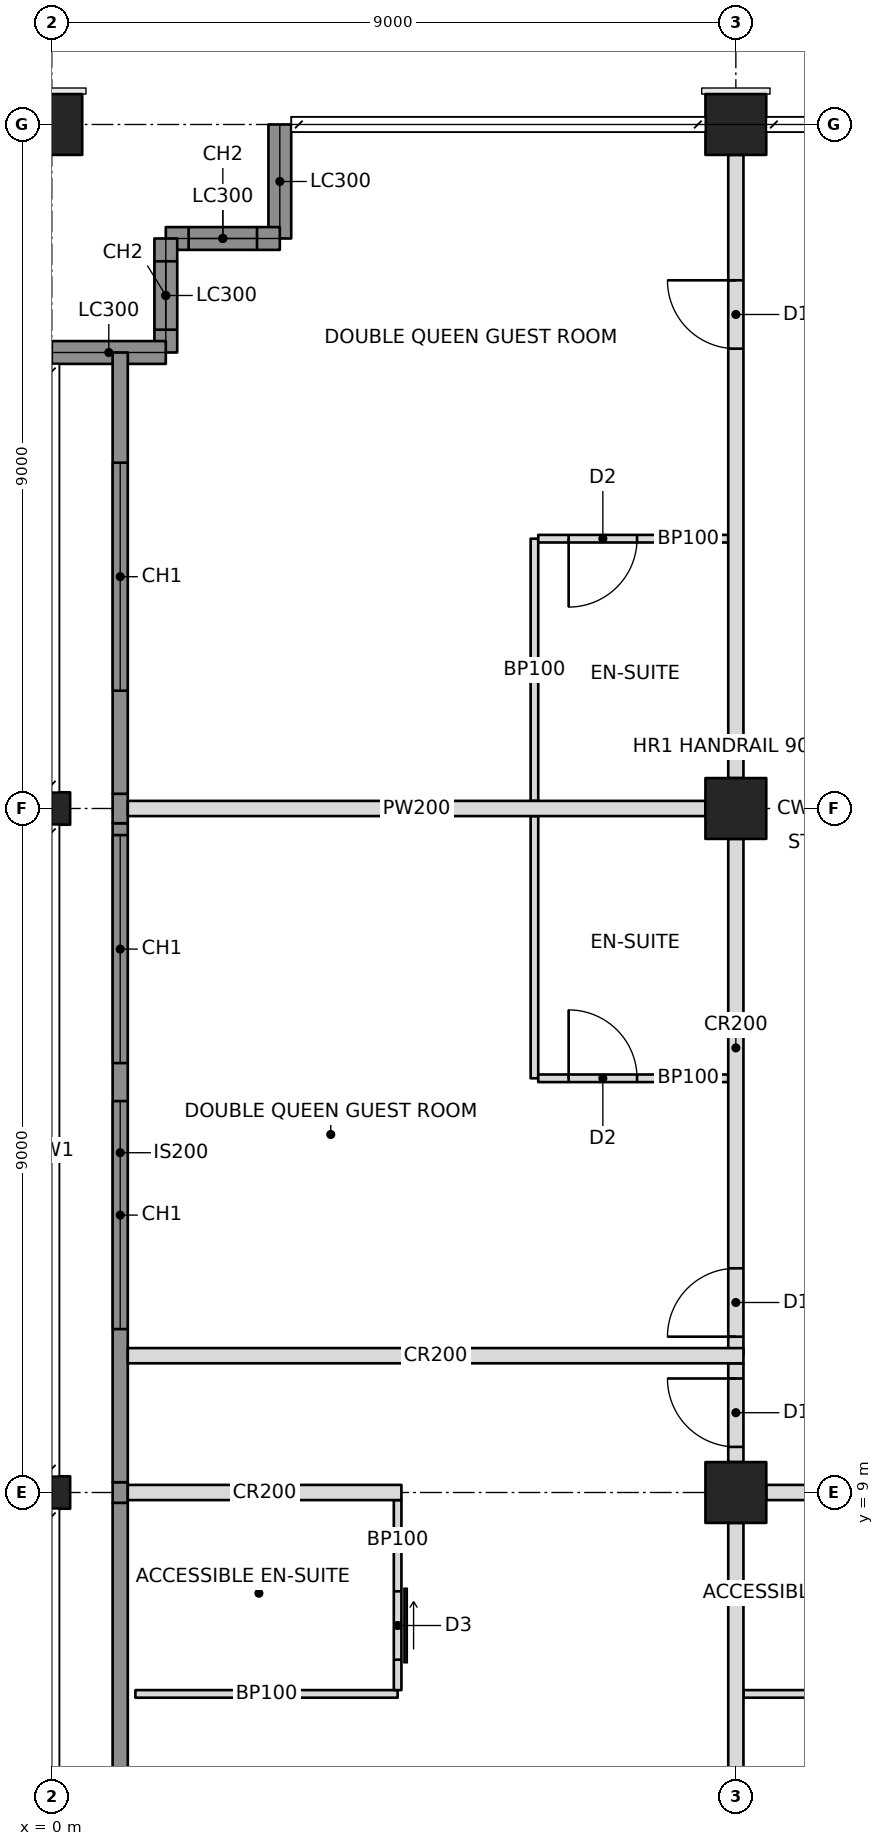
"""IFC4 building model, lengths in metres.
Left out: names, types, materials, properties, quantities, classifications, styles, units other than length and angle.
Written with IfcOpenShell. Run it as: python <this file> out.ifc"""

import sys

from ifc_helpers import new_model, si_unit, direction, frame, frame_2d, origin, origin_2d, place, context, subcontext, project, spatial, rectangle, hollow_rectangle, i_section, extrude, element, fill, save


model = new_model("IFC4")
c1 = context("Model", 3, precision=1e-05, world=origin(), true_north=direction((0.0, 1.0)))
c2 = subcontext(c1, "Body", "Model", "MODEL_VIEW")
j1 = project(units=[si_unit("LENGTHUNIT", "METRE"), si_unit("PLANEANGLEUNIT", "RADIAN")], contexts=[c1])
p1 = place(None, origin())
s1 = spatial("IfcSite", under=j1, at=p1, CompositionType="ELEMENT")
p2 = place(p1, origin())
s2 = spatial("IfcBuilding", under=s1, at=p2, CompositionType="ELEMENT")
p3 = place(p2, frame((0.0, 0.0, 194.4)))
s3 = spatial("IfcBuildingStorey", under=s2, at=p3, CompositionType="ELEMENT", Elevation=194.4)
for number, where, z_axis, x_axis in (
    (1, (0.0, 9.0, 0.0), (0.0, 0.0, 1.0), (0.0, 1.0, 0.0)),
    (2, (0.0, 18.0, 0.0), (0.0, 0.0, 1.0), (0.0, 1.0, 0.0)),
):
    element("IfcColumn", number, at=place(p3, frame(where, z_axis=z_axis, x_axis=x_axis)), inside=s3, PredefinedType="COLUMN", context=c2, shape_type="SweptSolid", body=[
        extrude(i_section(OverallWidth=0.427, OverallDepth=0.483, WebThickness=0.051, FlangeThickness=0.082, at=origin_2d()), origin(), (0.0, 0.0, 1.0), 3.4),
    ])
p4 = place(p3, frame((0.0, 27.0, 0.0), z_axis=(0.0, 0.0, 1.0), x_axis=(0.0, 1.0, 0.0)))
e3 = element("IfcColumn", 3, at=p4, inside=s3, PredefinedType="COLUMN", context=c2, shape_type="SweptSolid", body=[
    extrude(hollow_rectangle(XDim=0.8, YDim=0.8, WallThickness=0.06, at=origin_2d()), origin(), (0.0, 0.0, 1.0), 3.4),
])
for number, where, z_axis, x_axis in (
    (4, (9.0, 9.0, 0.0), (0.0, 0.0, 1.0), (1.0, 0.0, 0.0)),
    (5, (9.0, 18.0, 0.0), (0.0, 0.0, 1.0), (1.0, 0.0, 0.0)),
):
    element("IfcColumn", number, at=place(p3, frame(where, z_axis=z_axis, x_axis=x_axis)), inside=s3, PredefinedType="COLUMN", context=c2, shape_type="SweptSolid", body=[
        extrude(hollow_rectangle(XDim=0.8, YDim=0.8, WallThickness=0.05, at=origin_2d()), origin(), (0.0, 0.0, 1.0), 3.4),
    ])
p5 = place(p3, frame((9.0, 27.0, 0.0), z_axis=(0.0, 0.0, 1.0), x_axis=(1.0, 0.0, 0.0)))
e6 = element("IfcColumn", 6, at=p5, inside=s3, PredefinedType="COLUMN", context=c2, shape_type="SweptSolid", body=[
    extrude(hollow_rectangle(XDim=0.8, YDim=0.8, WallThickness=0.06, at=origin_2d()), origin(), (0.0, 0.0, 1.0), 3.4),
])
p6 = place(p3, frame((3.0, 27.0, 0.0), z_axis=(0.0, 0.0, 1.0), x_axis=(0.0, -1.0, 0.0)))
e7 = element("IfcWall", 7, at=p6, inside=s3, PredefinedType="SOLIDWALL", context=c2, shape_type="SweptSolid", body=[
    extrude(rectangle(XDim=1.5, YDim=0.3, at=frame_2d((0.75, 0.0))), origin(), (0.0, 0.0, 1.0), 2.42),
])
p7 = place(p3, frame((3.0, 25.5, 0.0), z_axis=(0.0, 0.0, 1.0), x_axis=(-1.0, 0.0, 0.0)))
e8 = element("IfcWall", 8, at=p7, inside=s3, PredefinedType="SOLIDWALL", context=c2, shape_type="SweptSolid", body=[
    extrude(rectangle(XDim=1.5, YDim=0.3, at=frame_2d((0.75, 0.0))), origin(), (0.0, 0.0, 1.0), 3.2),
])
p8 = place(p7, frame((0.3, 0.0, 0.6)))
e9 = element("IfcOpeningElement", 9, at=p8, cuts=e8, PredefinedType="OPENING", context=c2, shape_type="SweptSolid", body=[
    extrude(rectangle(XDim=0.9, YDim=2.2, at=frame_2d((0.45, 1.1))), frame((0.0, 0.16, 0.0), z_axis=(0.0, -1.0, 0.0), x_axis=(1.0, 0.0, 0.0)), (0.0, 0.0, 1.0), 0.32),
])
p9 = place(p3, frame((1.5, 25.5, 0.0), z_axis=(0.0, 0.0, 1.0), x_axis=(0.0, -1.0, 0.0)))
e10 = element("IfcWall", 10, at=p9, inside=s3, PredefinedType="SOLIDWALL", context=c2, shape_type="SweptSolid", body=[
    extrude(rectangle(XDim=1.5, YDim=0.3, at=frame_2d((0.75, 0.0))), origin(), (0.0, 0.0, 1.0), 3.2),
])
p10 = place(p9, frame((0.3, 0.0, 0.6)))
e11 = element("IfcOpeningElement", 11, at=p10, cuts=e10, PredefinedType="OPENING", context=c2, shape_type="SweptSolid", body=[
    extrude(rectangle(XDim=0.9, YDim=2.2, at=frame_2d((0.45, 1.1))), frame((0.0, 0.16, 0.0), z_axis=(0.0, -1.0, 0.0), x_axis=(1.0, 0.0, 0.0)), (0.0, 0.0, 1.0), 0.32),
])
p11 = place(p3, frame((1.5, 24.0, 0.0), z_axis=(0.0, 0.0, 1.0), x_axis=(-1.0, 0.0, 0.0)))
e12 = element("IfcWall", 12, at=p11, inside=s3, PredefinedType="SOLIDWALL", context=c2, shape_type="SweptSolid", body=[
    extrude(rectangle(XDim=1.5, YDim=0.3, at=frame_2d((0.75, 0.0))), origin(), (0.0, 0.0, 1.0), 2.42),
])
p12 = place(p3, frame((1.0, 9.0, 0.0), z_axis=(0.0, 0.0, 1.0), x_axis=(1.0, 0.0, 0.0)))
e13 = element("IfcWall", 13, at=p12, inside=s3, PredefinedType="PARTITIONING", context=c2, shape_type="SweptSolid", body=[
    extrude(rectangle(XDim=3.6, YDim=0.2, at=frame_2d((1.8, 0.0))), origin(), (0.0, 0.0, 1.0), 2.438),
])
p13 = place(p3, frame((9.4, 9.0, 0.0), z_axis=(0.0, 0.0, 1.0), x_axis=(1.0, 0.0, 0.0)))
e14 = element("IfcWall", 14, at=p13, inside=s3, PredefinedType="PARTITIONING", context=c2, shape_type="SweptSolid", body=[
    extrude(rectangle(XDim=8.2, YDim=0.2, at=frame_2d((4.1, 0.0))), origin(), (0.0, 0.0, 1.0), 2.405),
])
p14 = place(p13, frame((2.95, 0.0, 0.0)))
e15 = element("IfcOpeningElement", 15, at=p14, cuts=e14, PredefinedType="OPENING", context=c2, shape_type="SweptSolid", body=[
    extrude(rectangle(XDim=0.9, YDim=2.1, at=frame_2d((0.45, 1.05))), frame((0.0, 0.11, 0.0), z_axis=(0.0, -1.0, 0.0), x_axis=(1.0, 0.0, 0.0)), (0.0, 0.0, 1.0), 0.22),
])
p15 = place(p13, frame((4.35, 0.0, 0.0)))
e16 = element("IfcOpeningElement", 16, at=p15, cuts=e14, PredefinedType="OPENING", context=c2, shape_type="SweptSolid", body=[
    extrude(rectangle(XDim=0.9, YDim=2.1, at=frame_2d((0.45, 1.05))), frame((0.0, 0.11, 0.0), z_axis=(0.0, -1.0, 0.0), x_axis=(1.0, 0.0, 0.0)), (0.0, 0.0, 1.0), 0.22),
])
p16 = place(p3, frame((9.0, 10.8, 0.0), z_axis=(0.0, 0.0, 1.0), x_axis=(0.0, 1.0, 0.0)))
e17 = element("IfcWall", 17, at=p16, inside=s3, PredefinedType="PARTITIONING", context=c2, shape_type="SweptSolid", body=[
    extrude(rectangle(XDim=6.8, YDim=0.2, at=frame_2d((3.4, 0.0))), origin(), (0.0, 0.0, 1.0), 2.405),
])
p17 = place(p16, frame((0.25, 0.0, 0.0)))
e18 = element("IfcOpeningElement", 18, at=p17, cuts=e17, PredefinedType="OPENING", context=c2, shape_type="SweptSolid", body=[
    extrude(rectangle(XDim=0.9, YDim=2.1, at=frame_2d((0.45, 1.05))), frame((0.0, 0.11, 0.0), z_axis=(0.0, -1.0, 0.0), x_axis=(1.0, 0.0, 0.0)), (0.0, 0.0, 1.0), 0.22),
])
p18 = place(p3, frame((9.0, 18.4, 0.0), z_axis=(0.0, 0.0, 1.0), x_axis=(0.0, 1.0, 0.0)))
e19 = element("IfcWall", 19, at=p18, inside=s3, PredefinedType="PARTITIONING", context=c2, shape_type="SweptSolid", body=[
    extrude(rectangle(XDim=8.2, YDim=0.2, at=frame_2d((4.1, 0.0))), origin(), (0.0, 0.0, 1.0), 2.405),
])
p19 = place(p18, frame((5.65, 0.0, 0.0)))
e20 = element("IfcOpeningElement", 20, at=p19, cuts=e19, PredefinedType="OPENING", context=c2, shape_type="SweptSolid", body=[
    extrude(rectangle(XDim=0.9, YDim=2.1, at=frame_2d((0.45, 1.05))), frame((0.0, 0.11, 0.0), z_axis=(0.0, -1.0, 0.0), x_axis=(1.0, 0.0, 0.0)), (0.0, 0.0, 1.0), 0.22),
])
p20 = place(p3, frame((1.0, 10.8, 0.0), z_axis=(0.0, 0.0, 1.0), x_axis=(1.0, 0.0, 0.0)))
e21 = element("IfcWall", 21, at=p20, inside=s3, PredefinedType="PARTITIONING", context=c2, shape_type="SweptSolid", body=[
    extrude(rectangle(XDim=8.1, YDim=0.2, at=frame_2d((4.05, 0.0))), origin(), (0.0, 0.0, 1.0), 2.404),
])
p21 = place(p3, frame((9.0, 8.6, 0.0), z_axis=(0.0, 0.0, 1.0), x_axis=(0.0, -1.0, 0.0)))
e22 = element("IfcWall", 22, at=p21, inside=s3, PredefinedType="PARTITIONING", context=c2, shape_type="SweptSolid", body=[
    extrude(rectangle(XDim=7.6, YDim=0.2, at=frame_2d((3.8, 0.0))), origin(), (0.0, 0.0, 1.0), 2.438),
])
p22 = place(p3, frame((1.1, 6.35, 0.0), z_axis=(0.0, 0.0, 1.0), x_axis=(1.0, 0.0, 0.0)))
e23 = element("IfcWall", 23, at=p22, inside=s3, PredefinedType="PARTITIONING", context=c2, shape_type="SweptSolid", body=[
    extrude(rectangle(XDim=3.45, YDim=0.1, at=frame_2d((1.725, 0.0))), origin(), (0.0, 0.0, 1.0), 3.2),
])
p23 = place(p3, frame((4.55, 8.9, 0.0), z_axis=(0.0, 0.0, 1.0), x_axis=(0.0, -1.0, 0.0)))
e24 = element("IfcWall", 24, at=p23, inside=s3, PredefinedType="PARTITIONING", context=c2, shape_type="SweptSolid", body=[
    extrude(rectangle(XDim=2.5, YDim=0.1, at=frame_2d((1.25, 0.0))), origin(), (0.0, 0.0, 1.0), 2.438),
])
p24 = place(p23, frame((1.2, 0.0, 0.0)))
e25 = element("IfcOpeningElement", 25, at=p24, cuts=e24, PredefinedType="OPENING", context=c2, shape_type="SweptSolid", body=[
    extrude(rectangle(XDim=0.9, YDim=2.1, at=frame_2d((0.45, 1.05))), frame((0.0, 0.06, 0.0), z_axis=(0.0, -1.0, 0.0), x_axis=(1.0, 0.0, 0.0)), (0.0, 0.0, 1.0), 0.12),
])
p25 = place(p3, frame((9.1, 6.35, 0.0), z_axis=(0.0, 0.0, 1.0), x_axis=(1.0, 0.0, 0.0)))
e26 = element("IfcWall", 26, at=p25, inside=s3, PredefinedType="PARTITIONING", context=c2, shape_type="SweptSolid", body=[
    extrude(rectangle(XDim=2.95, YDim=0.1, at=frame_2d((1.475, 0.0))), origin(), (0.0, 0.0, 1.0), 2.438),
])
p26 = place(p3, frame((8.6, 18.0, 0.0), z_axis=(0.0, 0.0, 1.0), x_axis=(-1.0, 0.0, 0.0)))
e27 = element("IfcWall", 27, at=p26, inside=s3, PredefinedType="PARTITIONING", context=c2, shape_type="SweptSolid", body=[
    extrude(rectangle(XDim=7.6, YDim=0.2, at=frame_2d((3.8, 0.0))), origin(), (0.0, 0.0, 1.0), 2.405),
])
p27 = place(p3, frame((6.35, 14.45, 0.0), z_axis=(0.0, 0.0, 1.0), x_axis=(0.0, 1.0, 0.0)))
e28 = element("IfcWall", 28, at=p27, inside=s3, PredefinedType="PARTITIONING", context=c2, shape_type="SweptSolid", body=[
    extrude(rectangle(XDim=3.45, YDim=0.1, at=frame_2d((1.725, 0.0))), origin(), (0.0, 0.0, 1.0), 2.404),
])
p28 = place(p3, frame((8.9, 14.45, 0.0), z_axis=(0.0, 0.0, 1.0), x_axis=(-1.0, 0.0, 0.0)))
e29 = element("IfcWall", 29, at=p28, inside=s3, PredefinedType="PARTITIONING", context=c2, shape_type="SweptSolid", body=[
    extrude(rectangle(XDim=2.5, YDim=0.1, at=frame_2d((1.25, 0.0))), origin(), (0.0, 0.0, 1.0), 2.404),
])
p29 = place(p28, frame((1.2, 0.0, 0.0)))
e30 = element("IfcOpeningElement", 30, at=p29, cuts=e29, PredefinedType="OPENING", context=c2, shape_type="SweptSolid", body=[
    extrude(rectangle(XDim=0.9, YDim=2.1, at=frame_2d((0.45, 1.05))), frame((0.0, 0.06, 0.0), z_axis=(0.0, -1.0, 0.0), x_axis=(1.0, 0.0, 0.0)), (0.0, 0.0, 1.0), 0.12),
])
p30 = place(p3, frame((6.35, 18.1, 0.0), z_axis=(0.0, 0.0, 1.0), x_axis=(0.0, 1.0, 0.0)))
e31 = element("IfcWall", 31, at=p30, inside=s3, PredefinedType="PARTITIONING", context=c2, shape_type="SweptSolid", body=[
    extrude(rectangle(XDim=3.45, YDim=0.1, at=frame_2d((1.725, 0.0))), origin(), (0.0, 0.0, 1.0), 2.404),
])
p31 = place(p3, frame((8.9, 21.55, 0.0), z_axis=(0.0, 0.0, 1.0), x_axis=(-1.0, 0.0, 0.0)))
e32 = element("IfcWall", 32, at=p31, inside=s3, PredefinedType="PARTITIONING", context=c2, shape_type="SweptSolid", body=[
    extrude(rectangle(XDim=2.5, YDim=0.1, at=frame_2d((1.25, 0.0))), origin(), (0.0, 0.0, 1.0), 2.404),
])
p32 = place(p31, frame((1.2, 0.0, 0.0)))
e33 = element("IfcOpeningElement", 33, at=p32, cuts=e32, PredefinedType="OPENING", context=c2, shape_type="SweptSolid", body=[
    extrude(rectangle(XDim=0.9, YDim=2.1, at=frame_2d((0.45, 1.05))), frame((0.0, 0.06, 0.0), z_axis=(0.0, -1.0, 0.0), x_axis=(1.0, 0.0, 0.0)), (0.0, 0.0, 1.0), 0.12),
])
p33 = place(p3, frame((9.0, 9.4, 0.0), z_axis=(0.0, 0.0, 1.0), x_axis=(0.0, 1.0, 0.0)))
e34 = element("IfcWall", 34, at=p33, inside=s3, PredefinedType="PARTITIONING", context=c2, shape_type="SweptSolid", body=[
    extrude(rectangle(XDim=1.3, YDim=0.2, at=frame_2d((0.65, 0.0))), origin(), (0.0, 0.0, 1.0), 2.405),
])
p34 = place(p33, frame((0.2, 0.0, 0.0)))
e35 = element("IfcOpeningElement", 35, at=p34, cuts=e34, PredefinedType="OPENING", context=c2, shape_type="SweptSolid", body=[
    extrude(rectangle(XDim=0.9, YDim=2.1, at=frame_2d((0.45, 1.05))), frame((0.0, 0.11, 0.0), z_axis=(0.0, -1.0, 0.0), x_axis=(1.0, 0.0, 0.0)), (0.0, 0.0, 1.0), 0.22),
])
p35 = place(p3, frame((0.9, 4.607, 0.0), z_axis=(0.0, 0.0, 1.0), x_axis=(0.0, 1.0, 0.0)))
e36 = element("IfcWall", 36, at=p35, inside=s3, PredefinedType="SOLIDWALL", context=c2, shape_type="SweptSolid", body=[
    extrude(rectangle(XDim=4.257, YDim=0.2, at=frame_2d((2.129, 0.0))), origin(), (0.0, 0.0, 1.0), 3.2),
])
p36 = place(p3, frame((0.9, 8.865, 0.0), z_axis=(0.0, 0.0, 1.0), x_axis=(0.0, 1.0, 0.0)))
e37 = element("IfcWall", 37, at=p36, inside=s3, PredefinedType="SOLIDWALL", context=c2, shape_type="SweptSolid", body=[
    extrude(rectangle(XDim=0.271, YDim=0.2, at=frame_2d((0.135, 0.0))), origin(), (0.0, 0.0, 1.0), 2.438),
])
p37 = place(p3, frame((0.9, 9.135, 0.0), z_axis=(0.0, 0.0, 1.0), x_axis=(0.0, 1.0, 0.0)))
e38 = element("IfcWall", 38, at=p37, inside=s3, PredefinedType="SOLIDWALL", context=c2, shape_type="SweptSolid", body=[
    extrude(rectangle(XDim=8.671, YDim=0.2, at=frame_2d((4.335, 0.0))), origin(), (0.0, 0.0, 1.0), 3.2),
])
p38 = place(p37, frame((2.015, 0.0, 0.6)))
e39 = element("IfcOpeningElement", 39, at=p38, cuts=e38, PredefinedType="OPENING", context=c2, shape_type="SweptSolid", body=[
    extrude(rectangle(XDim=3.0, YDim=2.2, at=frame_2d((1.5, 1.1))), frame((0.0, 0.11, 0.0), z_axis=(0.0, -1.0, 0.0), x_axis=(1.0, 0.0, 0.0)), (0.0, 0.0, 1.0), 0.22),
])
p39 = place(p37, frame((5.515, 0.0, 0.6)))
e40 = element("IfcOpeningElement", 40, at=p39, cuts=e38, PredefinedType="OPENING", context=c2, shape_type="SweptSolid", body=[
    extrude(rectangle(XDim=3.0, YDim=2.2, at=frame_2d((1.5, 1.1))), frame((0.0, 0.11, 0.0), z_axis=(0.0, -1.0, 0.0), x_axis=(1.0, 0.0, 0.0)), (0.0, 0.0, 1.0), 0.22),
])
p40 = place(p3, frame((0.9, 17.806, 0.0), z_axis=(0.0, 0.0, 1.0), x_axis=(0.0, 1.0, 0.0)))
e41 = element("IfcWall", 41, at=p40, inside=s3, PredefinedType="SOLIDWALL", context=c2, shape_type="SweptSolid", body=[
    extrude(rectangle(XDim=0.388, YDim=0.2, at=frame_2d((0.194, 0.0))), origin(), (0.0, 0.0, 1.0), 2.404),
])
p41 = place(p3, frame((0.9, 18.194, 0.0), z_axis=(0.0, 0.0, 1.0), x_axis=(0.0, 1.0, 0.0)))
e42 = element("IfcWall", 42, at=p41, inside=s3, PredefinedType="SOLIDWALL", context=c2, shape_type="SweptSolid", body=[
    extrude(rectangle(XDim=5.806, YDim=0.2, at=frame_2d((2.903, 0.0))), origin(), (0.0, 0.0, 1.0), 3.2),
])
p42 = place(p41, frame((1.356, 0.0, 0.6)))
e43 = element("IfcOpeningElement", 43, at=p42, cuts=e42, PredefinedType="OPENING", context=c2, shape_type="SweptSolid", body=[
    extrude(rectangle(XDim=3.0, YDim=2.2, at=frame_2d((1.5, 1.1))), frame((0.0, 0.11, 0.0), z_axis=(0.0, -1.0, 0.0), x_axis=(1.0, 0.0, 0.0)), (0.0, 0.0, 1.0), 0.22),
])
p43 = place(p8, origin())
e44 = element("IfcWindow", 44, at=p43, inside=s3, PartitioningType="SINGLE_PANEL", PredefinedType="WINDOW", context=c2, shape_type="SweptSolid", body=[
    extrude(rectangle(XDim=0.9, YDim=2.2, at=frame_2d((0.45, 1.1))), frame((0.0, 0.03, 0.0), z_axis=(0.0, -1.0, 0.0), x_axis=(1.0, 0.0, 0.0)), (0.0, 0.0, 1.0), 0.06),
])
fill(e9, e44)
p44 = place(p10, origin())
e45 = element("IfcWindow", 45, at=p44, inside=s3, PartitioningType="SINGLE_PANEL", PredefinedType="WINDOW", context=c2, shape_type="SweptSolid", body=[
    extrude(rectangle(XDim=0.9, YDim=2.2, at=frame_2d((0.45, 1.1))), frame((0.0, 0.03, 0.0), z_axis=(0.0, -1.0, 0.0), x_axis=(1.0, 0.0, 0.0)), (0.0, 0.0, 1.0), 0.06),
])
fill(e11, e45)
p45 = place(p38, origin())
e46 = element("IfcWindow", 46, at=p45, inside=s3, PartitioningType="TRIPLE_PANEL_VERTICAL", PredefinedType="WINDOW", context=c2, shape_type="SweptSolid", body=[
    extrude(rectangle(XDim=3.0, YDim=2.2, at=frame_2d((1.5, 1.1))), frame((0.0, 0.03, 0.0), z_axis=(0.0, -1.0, 0.0), x_axis=(1.0, 0.0, 0.0)), (0.0, 0.0, 1.0), 0.06),
])
fill(e39, e46)
p46 = place(p39, origin())
e47 = element("IfcWindow", 47, at=p46, inside=s3, PartitioningType="TRIPLE_PANEL_VERTICAL", PredefinedType="WINDOW", context=c2, shape_type="SweptSolid", body=[
    extrude(rectangle(XDim=3.0, YDim=2.2, at=frame_2d((1.5, 1.1))), frame((0.0, 0.03, 0.0), z_axis=(0.0, -1.0, 0.0), x_axis=(1.0, 0.0, 0.0)), (0.0, 0.0, 1.0), 0.06),
])
fill(e40, e47)
p47 = place(p42, origin())
e48 = element("IfcWindow", 48, at=p47, inside=s3, PartitioningType="TRIPLE_PANEL_VERTICAL", PredefinedType="WINDOW", context=c2, shape_type="SweptSolid", body=[
    extrude(rectangle(XDim=3.0, YDim=2.2, at=frame_2d((1.5, 1.1))), frame((0.0, 0.03, 0.0), z_axis=(0.0, -1.0, 0.0), x_axis=(1.0, 0.0, 0.0)), (0.0, 0.0, 1.0), 0.06),
])
fill(e43, e48)
p48 = place(p24, origin())
e49 = element("IfcDoor", 49, at=p48, inside=s3, OperationType="SLIDING_TO_LEFT", PredefinedType="DOOR", context=c2, shape_type="SweptSolid", body=[
    extrude(rectangle(XDim=0.9, YDim=2.1, at=frame_2d((0.45, 1.05))), frame((0.0, 0.025, 0.0), z_axis=(0.0, -1.0, 0.0), x_axis=(1.0, 0.0, 0.0)), (0.0, 0.0, 1.0), 0.05),
])
fill(e25, e49)
p49 = place(p29, frame((0.9, 0.0, 0.0), z_axis=(0.0, 0.0, 1.0), x_axis=(-1.0, 0.0, 0.0)))
e50 = element("IfcDoor", 50, at=p49, inside=s3, OperationType="SINGLE_SWING_LEFT", PredefinedType="DOOR", context=c2, shape_type="SweptSolid", body=[
    extrude(rectangle(XDim=0.9, YDim=2.1, at=frame_2d((0.45, 1.05))), frame((0.0, 0.025, 0.0), z_axis=(0.0, -1.0, 0.0), x_axis=(1.0, 0.0, 0.0)), (0.0, 0.0, 1.0), 0.05),
])
fill(e30, e50)
p50 = place(p17, origin())
e51 = element("IfcDoor", 51, at=p50, inside=s3, OperationType="SINGLE_SWING_LEFT", PredefinedType="DOOR", context=c2, shape_type="SweptSolid", body=[
    extrude(rectangle(XDim=0.9, YDim=2.1, at=frame_2d((0.45, 1.05))), frame((0.0, 0.025, 0.0), z_axis=(0.0, -1.0, 0.0), x_axis=(1.0, 0.0, 0.0)), (0.0, 0.0, 1.0), 0.05),
])
fill(e18, e51)
p51 = place(p32, origin())
e52 = element("IfcDoor", 52, at=p51, inside=s3, OperationType="SINGLE_SWING_RIGHT", PredefinedType="DOOR", context=c2, shape_type="SweptSolid", body=[
    extrude(rectangle(XDim=0.9, YDim=2.1, at=frame_2d((0.45, 1.05))), frame((0.0, 0.025, 0.0), z_axis=(0.0, -1.0, 0.0), x_axis=(1.0, 0.0, 0.0)), (0.0, 0.0, 1.0), 0.05),
])
fill(e33, e52)
p52 = place(p19, origin())
e53 = element("IfcDoor", 53, at=p52, inside=s3, OperationType="SINGLE_SWING_RIGHT", PredefinedType="DOOR", context=c2, shape_type="SweptSolid", body=[
    extrude(rectangle(XDim=0.9, YDim=2.1, at=frame_2d((0.45, 1.05))), frame((0.0, 0.025, 0.0), z_axis=(0.0, -1.0, 0.0), x_axis=(1.0, 0.0, 0.0)), (0.0, 0.0, 1.0), 0.05),
])
fill(e20, e53)
p53 = place(p34, origin())
e54 = element("IfcDoor", 54, at=p53, inside=s3, OperationType="SINGLE_SWING_RIGHT", PredefinedType="DOOR", context=c2, shape_type="SweptSolid", body=[
    extrude(rectangle(XDim=0.9, YDim=2.1, at=frame_2d((0.45, 1.05))), frame((0.0, 0.025, 0.0), z_axis=(0.0, -1.0, 0.0), x_axis=(1.0, 0.0, 0.0)), (0.0, 0.0, 1.0), 0.05),
])
fill(e35, e54)
save(model, sys.argv[1])
